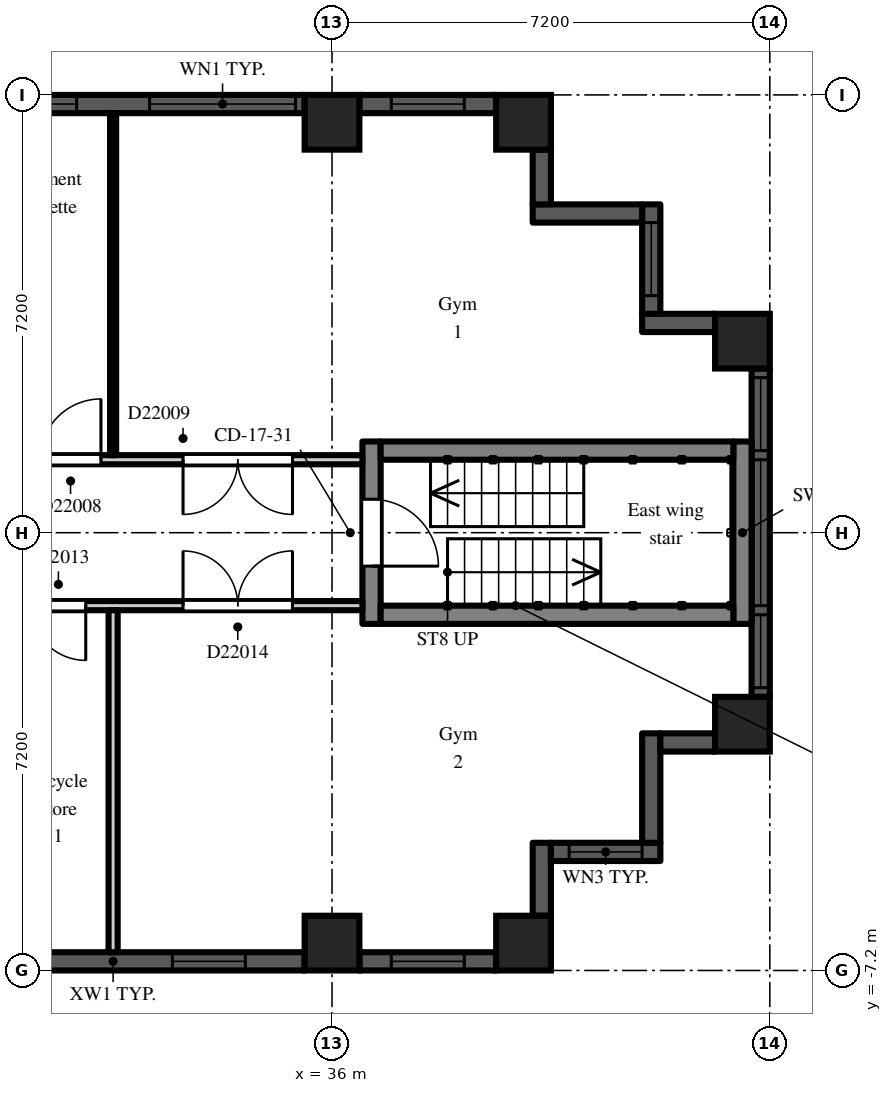
"""IFC4 building model, lengths in metres.
Left out: names, types, materials, properties, quantities, classifications, styles, units other than length and angle.
Written with IfcOpenShell. Run it as: python <this file> out.ifc"""

import sys

from ifc_helpers import new_model, si_unit, direction, frame, frame_2d, origin, origin_2d, place, context, subcontext, project, spatial, rectangle, extrude, element, fill, save


model = new_model("IFC4")
c1 = context("Model", 3, precision=1e-05, world=origin(), true_north=direction((0.0, 1.0)))
c2 = subcontext(c1, "Body", "Model", "MODEL_VIEW")
j1 = project(units=[si_unit("LENGTHUNIT", "METRE"), si_unit("PLANEANGLEUNIT", "RADIAN")], contexts=[c1])
p1 = place(None, origin())
s1 = spatial("IfcSite", under=j1, at=p1, CompositionType="ELEMENT")
p2 = place(p1, origin())
s2 = spatial("IfcBuilding", under=s1, at=p2, CompositionType="ELEMENT")
p3 = place(p2, frame((0.0, 0.0, 156.3)))
s3 = spatial("IfcBuildingStorey", under=s2, at=p3, CompositionType="ELEMENT", Elevation=156.3)
for number, where, z_axis, x_axis in (
    (1, (36.0, -6.75, 0.0), (0.0, 0.0, 1.0), (1.0, 0.0, 0.0)),
    (2, (36.0, 6.75, 0.0), (0.0, 0.0, 1.0), (1.0, 0.0, 0.0)),
    (3, (39.15, -6.75, 0.0), (0.0, 0.0, 1.0), (1.0, 0.0, 0.0)),
    (4, (39.15, 6.75, 0.0), (0.0, 0.0, 1.0), (1.0, 0.0, 0.0)),
    (5, (42.75, -3.15, 0.0), (0.0, 0.0, 1.0), (1.0, 0.0, 0.0)),
    (6, (42.75, 3.15, 0.0), (0.0, 0.0, 1.0), (1.0, 0.0, 0.0)),
):
    element("IfcColumn", number, at=place(p3, frame(where, z_axis=z_axis, x_axis=x_axis)), inside=s3, PredefinedType="COLUMN", context=c2, shape_type="SweptSolid", body=[
        extrude(rectangle(XDim=0.9, YDim=0.9, at=origin_2d()), origin(), (0.0, 0.0, 1.0), 3.0),
    ])
p4 = place(p3, frame((29.25, -7.05, 0.0), z_axis=(0.0, 0.0, 1.0), x_axis=(1.0, 0.0, 0.0)))
e7 = element("IfcWall", 7, at=p4, inside=s3, PredefinedType="SOLIDWALL", context=c2, shape_type="SweptSolid", body=[
    extrude(rectangle(XDim=6.3, YDim=0.3, at=frame_2d((3.15, 0.0))), origin(), (0.0, 0.0, 1.0), 2.2),
])
p5 = place(p4, frame((4.125, 0.0, 0.2)))
e8 = element("IfcOpeningElement", 8, at=p5, cuts=e7, PredefinedType="OPENING", context=c2, shape_type="SweptSolid", body=[
    extrude(rectangle(XDim=1.2, YDim=1.85, at=frame_2d((0.6, 0.925))), frame((0.0, 0.16, 0.0), z_axis=(0.0, -1.0, 0.0), x_axis=(1.0, 0.0, 0.0)), (0.0, 0.0, 1.0), 0.32),
])
p6 = place(p3, frame((36.45, -7.05, 0.0), z_axis=(0.0, 0.0, 1.0), x_axis=(1.0, 0.0, 0.0)))
e9 = element("IfcWall", 9, at=p6, inside=s3, PredefinedType="SOLIDWALL", context=c2, shape_type="SweptSolid", body=[
    extrude(rectangle(XDim=2.25, YDim=0.3, at=frame_2d((1.125, 0.0))), origin(), (0.0, 0.0, 1.0), 2.2),
])
p7 = place(p6, frame((0.525, 0.0, 0.2)))
e10 = element("IfcOpeningElement", 10, at=p7, cuts=e9, PredefinedType="OPENING", context=c2, shape_type="SweptSolid", body=[
    extrude(rectangle(XDim=1.2, YDim=1.85, at=frame_2d((0.6, 0.925))), frame((0.0, 0.16, 0.0), z_axis=(0.0, -1.0, 0.0), x_axis=(1.0, 0.0, 0.0)), (0.0, 0.0, 1.0), 0.32),
])
p8 = place(p3, frame((39.45, -6.3, 0.0), z_axis=(0.0, 0.0, 1.0), x_axis=(0.0, 1.0, 0.0)))
e11 = element("IfcWall", 11, at=p8, inside=s3, PredefinedType="SOLIDWALL", context=c2, shape_type="SweptSolid", body=[
    extrude(rectangle(XDim=1.2, YDim=0.3, at=frame_2d((0.6, 0.0))), origin(), (0.0, 0.0, 1.0), 2.6),
])
p9 = place(p3, frame((39.6, -5.25, 0.0), z_axis=(0.0, 0.0, 1.0), x_axis=(1.0, 0.0, 0.0)))
e12 = element("IfcWall", 12, at=p9, inside=s3, PredefinedType="SOLIDWALL", context=c2, shape_type="SweptSolid", body=[
    extrude(rectangle(XDim=1.8, YDim=0.3, at=frame_2d((0.9, 0.0))), origin(), (0.0, 0.0, 1.0), 2.6),
])
p10 = place(p9, frame((0.3, 0.0, 0.2)))
e13 = element("IfcOpeningElement", 13, at=p10, cuts=e12, PredefinedType="OPENING", context=c2, shape_type="SweptSolid", body=[
    extrude(rectangle(XDim=1.2, YDim=1.85, at=frame_2d((0.6, 0.925))), frame((0.0, 0.16, 0.0), z_axis=(0.0, -1.0, 0.0), x_axis=(1.0, 0.0, 0.0)), (0.0, 0.0, 1.0), 0.32),
])
p11 = place(p3, frame((41.25, -5.1, 0.0), z_axis=(0.0, 0.0, 1.0), x_axis=(0.0, 1.0, 0.0)))
e14 = element("IfcWall", 14, at=p11, inside=s3, PredefinedType="SOLIDWALL", context=c2, shape_type="SweptSolid", body=[
    extrude(rectangle(XDim=1.8, YDim=0.3, at=frame_2d((0.9, 0.0))), origin(), (0.0, 0.0, 1.0), 2.6),
])
p12 = place(p3, frame((41.4, -3.45, 0.0), z_axis=(0.0, 0.0, 1.0), x_axis=(1.0, 0.0, 0.0)))
e15 = element("IfcWall", 15, at=p12, inside=s3, PredefinedType="SOLIDWALL", context=c2, shape_type="SweptSolid", body=[
    extrude(rectangle(XDim=0.9, YDim=0.3, at=frame_2d((0.45, 0.0))), origin(), (0.0, 0.0, 1.0), 2.6),
])
p13 = place(p3, frame((43.05, -2.7, 0.0), z_axis=(0.0, 0.0, 1.0), x_axis=(0.0, 1.0, 0.0)))
e16 = element("IfcWall", 16, at=p13, inside=s3, PredefinedType="SOLIDWALL", context=c2, shape_type="SweptSolid", body=[
    extrude(rectangle(XDim=5.4, YDim=0.3, at=frame_2d((2.7, 0.0))), origin(), (0.0, 0.0, 1.0), 2.2),
])
p14 = place(p13, frame((1.5, 0.0, 0.2)))
e17 = element("IfcOpeningElement", 17, at=p14, cuts=e16, PredefinedType="OPENING", context=c2, shape_type="SweptSolid", body=[
    extrude(rectangle(XDim=2.4, YDim=1.85, at=frame_2d((1.2, 0.925))), frame((0.0, 0.16, 0.0), z_axis=(0.0, -1.0, 0.0), x_axis=(1.0, 0.0, 0.0)), (0.0, 0.0, 1.0), 0.32),
])
p15 = place(p13, frame((0.15, 0.0, 0.2)))
e18 = element("IfcOpeningElement", 18, at=p15, cuts=e16, PredefinedType="OPENING", context=c2, shape_type="SweptSolid", body=[
    extrude(rectangle(XDim=1.2, YDim=1.85, at=frame_2d((0.6, 0.925))), frame((0.0, 0.16, 0.0), z_axis=(0.0, -1.0, 0.0), x_axis=(1.0, 0.0, 0.0)), (0.0, 0.0, 1.0), 0.32),
])
p16 = place(p13, frame((4.05, 0.0, 0.2)))
e19 = element("IfcOpeningElement", 19, at=p16, cuts=e16, PredefinedType="OPENING", context=c2, shape_type="SweptSolid", body=[
    extrude(rectangle(XDim=1.2, YDim=1.85, at=frame_2d((0.6, 0.925))), frame((0.0, 0.16, 0.0), z_axis=(0.0, -1.0, 0.0), x_axis=(1.0, 0.0, 0.0)), (0.0, 0.0, 1.0), 0.32),
])
p17 = place(p3, frame((42.3, 3.45, 0.0), z_axis=(0.0, 0.0, 1.0), x_axis=(-1.0, 0.0, 0.0)))
e20 = element("IfcWall", 20, at=p17, inside=s3, PredefinedType="SOLIDWALL", context=c2, shape_type="SweptSolid", body=[
    extrude(rectangle(XDim=1.2, YDim=0.3, at=frame_2d((0.6, 0.0))), origin(), (0.0, 0.0, 1.0), 2.6),
])
p18 = place(p3, frame((41.25, 3.6, 0.0), z_axis=(0.0, 0.0, 1.0), x_axis=(0.0, 1.0, 0.0)))
e21 = element("IfcWall", 21, at=p18, inside=s3, PredefinedType="SOLIDWALL", context=c2, shape_type="SweptSolid", body=[
    extrude(rectangle(XDim=1.8, YDim=0.3, at=frame_2d((0.9, 0.0))), origin(), (0.0, 0.0, 1.0), 2.6),
])
p19 = place(p18, frame((0.3, 0.0, 0.2)))
e22 = element("IfcOpeningElement", 22, at=p19, cuts=e21, PredefinedType="OPENING", context=c2, shape_type="SweptSolid", body=[
    extrude(rectangle(XDim=1.2, YDim=1.85, at=frame_2d((0.6, 0.925))), frame((0.0, 0.16, 0.0), z_axis=(0.0, -1.0, 0.0), x_axis=(1.0, 0.0, 0.0)), (0.0, 0.0, 1.0), 0.32),
])
p20 = place(p3, frame((41.1, 5.25, 0.0), z_axis=(0.0, 0.0, 1.0), x_axis=(-1.0, 0.0, 0.0)))
e23 = element("IfcWall", 23, at=p20, inside=s3, PredefinedType="SOLIDWALL", context=c2, shape_type="SweptSolid", body=[
    extrude(rectangle(XDim=1.8, YDim=0.3, at=frame_2d((0.9, 0.0))), origin(), (0.0, 0.0, 1.0), 2.6),
])
p21 = place(p3, frame((39.45, 5.4, 0.0), z_axis=(0.0, 0.0, 1.0), x_axis=(0.0, 1.0, 0.0)))
e24 = element("IfcWall", 24, at=p21, inside=s3, PredefinedType="SOLIDWALL", context=c2, shape_type="SweptSolid", body=[
    extrude(rectangle(XDim=0.9, YDim=0.3, at=frame_2d((0.45, 0.0))), origin(), (0.0, 0.0, 1.0), 2.6),
])
p22 = place(p3, frame((38.7, 7.05, 0.0), z_axis=(0.0, 0.0, 1.0), x_axis=(-1.0, 0.0, 0.0)))
e25 = element("IfcWall", 25, at=p22, inside=s3, PredefinedType="SOLIDWALL", context=c2, shape_type="SweptSolid", body=[
    extrude(rectangle(XDim=2.25, YDim=0.3, at=frame_2d((1.125, 0.0))), origin(), (0.0, 0.0, 1.0), 2.2),
])
p23 = place(p22, frame((0.525, 0.0, 0.2)))
e26 = element("IfcOpeningElement", 26, at=p23, cuts=e25, PredefinedType="OPENING", context=c2, shape_type="SweptSolid", body=[
    extrude(rectangle(XDim=1.2, YDim=1.85, at=frame_2d((0.6, 0.925))), frame((0.0, 0.16, 0.0), z_axis=(0.0, -1.0, 0.0), x_axis=(1.0, 0.0, 0.0)), (0.0, 0.0, 1.0), 0.32),
])
p24 = place(p3, frame((35.55, 7.05, 0.0), z_axis=(0.0, 0.0, 1.0), x_axis=(-1.0, 0.0, 0.0)))
e27 = element("IfcWall", 27, at=p24, inside=s3, PredefinedType="SOLIDWALL", context=c2, shape_type="SweptSolid", body=[
    extrude(rectangle(XDim=6.3, YDim=0.3, at=frame_2d((3.15, 0.0))), origin(), (0.0, 0.0, 1.0), 2.2),
])
p25 = place(p24, frame((0.15, 0.0, 0.2)))
e28 = element("IfcOpeningElement", 28, at=p25, cuts=e27, PredefinedType="OPENING", context=c2, shape_type="SweptSolid", body=[
    extrude(rectangle(XDim=2.4, YDim=1.85, at=frame_2d((1.2, 0.925))), frame((0.0, 0.16, 0.0), z_axis=(0.0, -1.0, 0.0), x_axis=(1.0, 0.0, 0.0)), (0.0, 0.0, 1.0), 0.32),
])
p26 = place(p24, frame((3.75, 0.0, 0.2)))
e29 = element("IfcOpeningElement", 29, at=p26, cuts=e27, PredefinedType="OPENING", context=c2, shape_type="SweptSolid", body=[
    extrude(rectangle(XDim=2.4, YDim=1.85, at=frame_2d((1.2, 0.925))), frame((0.0, 0.16, 0.0), z_axis=(0.0, -1.0, 0.0), x_axis=(1.0, 0.0, 0.0)), (0.0, 0.0, 1.0), 0.32),
])
p27 = place(p3, frame((36.65, -1.5, 0.0), z_axis=(0.0, 0.0, 1.0), x_axis=(0.0, 1.0, 0.0)))
e30 = element("IfcWall", 30, at=p27, inside=s3, PredefinedType="SHEAR", context=c2, shape_type="SweptSolid", body=[
    extrude(rectangle(XDim=3.0, YDim=0.3, at=frame_2d((1.5, 0.0))), origin(), (0.0, 0.0, 1.0), 2.6),
])
p28 = place(p27, frame((0.95, 0.0, 0.0)))
e31 = element("IfcOpeningElement", 31, at=p28, cuts=e30, PredefinedType="OPENING", context=c2, shape_type="SweptSolid", body=[
    extrude(rectangle(XDim=1.1, YDim=2.1, at=frame_2d((0.55, 1.05))), frame((0.0, 0.16, 0.0), z_axis=(0.0, -1.0, 0.0), x_axis=(1.0, 0.0, 0.0)), (0.0, 0.0, 1.0), 0.32),
])
p29 = place(p3, frame((42.75, -1.5, 0.0), z_axis=(0.0, 0.0, 1.0), x_axis=(0.0, 1.0, 0.0)))
e32 = element("IfcWall", 32, at=p29, inside=s3, PredefinedType="SHEAR", context=c2, shape_type="SweptSolid", body=[
    extrude(rectangle(XDim=3.0, YDim=0.3, at=frame_2d((1.5, 0.0))), origin(), (0.0, 0.0, 1.0), 2.6),
])
for number, where, z_axis, x_axis in (
    (33, (36.8, -1.35, 0.0), (0.0, 0.0, 1.0), (1.0, 0.0, 0.0)),
    (34, (36.8, 1.35, 0.0), (0.0, 0.0, 1.0), (1.0, 0.0, 0.0)),
):
    element("IfcWall", number, at=place(p3, frame(where, z_axis=z_axis, x_axis=x_axis)), inside=s3, PredefinedType="SHEAR", context=c2, shape_type="SweptSolid", body=[
        extrude(rectangle(XDim=5.8, YDim=0.3, at=frame_2d((2.9, 0.0))), origin(), (0.0, 0.0, 1.0), 2.6),
    ])
p30 = place(p3, frame((21.6, -1.2, 0.0), z_axis=(0.0, 0.0, 1.0), x_axis=(1.0, 0.0, 0.0)))
e35 = element("IfcWall", 35, at=p30, inside=s3, PredefinedType="PARTITIONING", context=c2, shape_type="SweptSolid", body=[
    extrude(rectangle(XDim=14.9, YDim=0.15, at=frame_2d((7.45, 0.0))), origin(), (0.0, 0.0, 1.0), 2.6),
])
p31 = place(p30, frame((3.8, 0.0, 0.0)))
e36 = element("IfcOpeningElement", 36, at=p31, cuts=e35, PredefinedType="OPENING", context=c2, shape_type="SweptSolid", body=[
    extrude(rectangle(XDim=1.0, YDim=2.1, at=frame_2d((0.5, 1.05))), frame((0.0, 0.085, 0.0), z_axis=(0.0, -1.0, 0.0), x_axis=(1.0, 0.0, 0.0)), (0.0, 0.0, 1.0), 0.17),
])
p32 = place(p30, frame((7.65, 0.0, 0.0)))
e37 = element("IfcOpeningElement", 37, at=p32, cuts=e35, PredefinedType="OPENING", context=c2, shape_type="SweptSolid", body=[
    extrude(rectangle(XDim=0.9, YDim=2.1, at=frame_2d((0.45, 1.05))), frame((0.0, 0.085, 0.0), z_axis=(0.0, -1.0, 0.0), x_axis=(1.0, 0.0, 0.0)), (0.0, 0.0, 1.0), 0.17),
])
p33 = place(p30, frame((9.45, 0.0, 0.0)))
e38 = element("IfcOpeningElement", 38, at=p33, cuts=e35, PredefinedType="OPENING", context=c2, shape_type="SweptSolid", body=[
    extrude(rectangle(XDim=0.9, YDim=2.1, at=frame_2d((0.45, 1.05))), frame((0.0, 0.085, 0.0), z_axis=(0.0, -1.0, 0.0), x_axis=(1.0, 0.0, 0.0)), (0.0, 0.0, 1.0), 0.17),
])
p34 = place(p30, frame((11.95, 0.0, 0.0)))
e39 = element("IfcOpeningElement", 39, at=p34, cuts=e35, PredefinedType="OPENING", context=c2, shape_type="SweptSolid", body=[
    extrude(rectangle(XDim=1.8, YDim=2.1, at=frame_2d((0.9, 1.05))), frame((0.0, 0.085, 0.0), z_axis=(0.0, -1.0, 0.0), x_axis=(1.0, 0.0, 0.0)), (0.0, 0.0, 1.0), 0.17),
])
p35 = place(p3, frame((21.6, 1.2, 0.0), z_axis=(0.0, 0.0, 1.0), x_axis=(1.0, 0.0, 0.0)))
e40 = element("IfcWall", 40, at=p35, inside=s3, PredefinedType="PARTITIONING", context=c2, shape_type="SweptSolid", body=[
    extrude(rectangle(XDim=14.9, YDim=0.15, at=frame_2d((7.45, 0.0))), origin(), (0.0, 0.0, 1.0), 2.6),
])
p36 = place(p35, frame((2.7, 0.0, 0.0)))
e41 = element("IfcOpeningElement", 41, at=p36, cuts=e40, PredefinedType="OPENING", context=c2, shape_type="SweptSolid", body=[
    extrude(rectangle(XDim=1.8, YDim=2.1, at=frame_2d((0.9, 1.05))), frame((0.0, 0.085, 0.0), z_axis=(0.0, -1.0, 0.0), x_axis=(1.0, 0.0, 0.0)), (0.0, 0.0, 1.0), 0.17),
])
p37 = place(p35, frame((9.6, 0.0, 0.0)))
e42 = element("IfcOpeningElement", 42, at=p37, cuts=e40, PredefinedType="OPENING", context=c2, shape_type="SweptSolid", body=[
    extrude(rectangle(XDim=1.0, YDim=2.1, at=frame_2d((0.5, 1.05))), frame((0.0, 0.085, 0.0), z_axis=(0.0, -1.0, 0.0), x_axis=(1.0, 0.0, 0.0)), (0.0, 0.0, 1.0), 0.17),
])
p38 = place(p35, frame((11.95, 0.0, 0.0)))
e43 = element("IfcOpeningElement", 43, at=p38, cuts=e40, PredefinedType="OPENING", context=c2, shape_type="SweptSolid", body=[
    extrude(rectangle(XDim=1.8, YDim=2.1, at=frame_2d((0.9, 1.05))), frame((0.0, 0.085, 0.0), z_axis=(0.0, -1.0, 0.0), x_axis=(1.0, 0.0, 0.0)), (0.0, 0.0, 1.0), 0.17),
])
p39 = place(p3, frame((32.4, -6.9, 0.0), z_axis=(0.0, 0.0, 1.0), x_axis=(0.0, 1.0, 0.0)))
e44 = element("IfcWall", 44, at=p39, inside=s3, PredefinedType="PARTITIONING", context=c2, shape_type="SweptSolid", body=[
    extrude(rectangle(XDim=5.625, YDim=0.15, at=frame_2d((2.812, 0.0))), origin(), (0.0, 0.0, 1.0), 2.6),
])
p40 = place(p3, frame((32.4, 1.275, 0.0), z_axis=(0.0, 0.0, 1.0), x_axis=(0.0, 1.0, 0.0)))
e45 = element("IfcWall", 45, at=p40, inside=s3, PredefinedType="PARTITIONING", context=c2, shape_type="SweptSolid", body=[
    extrude(rectangle(XDim=5.625, YDim=0.1, at=frame_2d((2.812, 0.0))), origin(), (0.0, 0.0, 1.0), 2.6),
])
p41 = place(p5, origin())
e46 = element("IfcWindow", 46, at=p41, inside=s3, PartitioningType="SINGLE_PANEL", PredefinedType="WINDOW", context=c2, shape_type="SweptSolid", body=[
    extrude(rectangle(XDim=1.2, YDim=1.85, at=frame_2d((0.6, 0.925))), frame((0.0, 0.03, 0.0), z_axis=(0.0, -1.0, 0.0), x_axis=(1.0, 0.0, 0.0)), (0.0, 0.0, 1.0), 0.06),
])
fill(e8, e46)
p42 = place(p7, origin())
e47 = element("IfcWindow", 47, at=p42, inside=s3, PartitioningType="SINGLE_PANEL", PredefinedType="WINDOW", context=c2, shape_type="SweptSolid", body=[
    extrude(rectangle(XDim=1.2, YDim=1.85, at=frame_2d((0.6, 0.925))), frame((0.0, 0.03, 0.0), z_axis=(0.0, -1.0, 0.0), x_axis=(1.0, 0.0, 0.0)), (0.0, 0.0, 1.0), 0.06),
])
fill(e10, e47)
p43 = place(p10, origin())
e48 = element("IfcWindow", 48, at=p43, inside=s3, PartitioningType="SINGLE_PANEL", PredefinedType="WINDOW", context=c2, shape_type="SweptSolid", body=[
    extrude(rectangle(XDim=1.2, YDim=1.85, at=frame_2d((0.6, 0.925))), frame((0.0, 0.03, 0.0), z_axis=(0.0, -1.0, 0.0), x_axis=(1.0, 0.0, 0.0)), (0.0, 0.0, 1.0), 0.06),
])
fill(e13, e48)
p44 = place(p14, origin())
e49 = element("IfcWindow", 49, at=p44, inside=s3, PartitioningType="SINGLE_PANEL", PredefinedType="WINDOW", context=c2, shape_type="SweptSolid", body=[
    extrude(rectangle(XDim=2.4, YDim=1.85, at=frame_2d((1.2, 0.925))), frame((0.0, 0.03, 0.0), z_axis=(0.0, -1.0, 0.0), x_axis=(1.0, 0.0, 0.0)), (0.0, 0.0, 1.0), 0.06),
])
fill(e17, e49)
p45 = place(p15, origin())
e50 = element("IfcWindow", 50, at=p45, inside=s3, PartitioningType="SINGLE_PANEL", PredefinedType="WINDOW", context=c2, shape_type="SweptSolid", body=[
    extrude(rectangle(XDim=1.2, YDim=1.85, at=frame_2d((0.6, 0.925))), frame((0.0, 0.03, 0.0), z_axis=(0.0, -1.0, 0.0), x_axis=(1.0, 0.0, 0.0)), (0.0, 0.0, 1.0), 0.06),
])
fill(e18, e50)
p46 = place(p16, origin())
e51 = element("IfcWindow", 51, at=p46, inside=s3, PartitioningType="SINGLE_PANEL", PredefinedType="WINDOW", context=c2, shape_type="SweptSolid", body=[
    extrude(rectangle(XDim=1.2, YDim=1.85, at=frame_2d((0.6, 0.925))), frame((0.0, 0.03, 0.0), z_axis=(0.0, -1.0, 0.0), x_axis=(1.0, 0.0, 0.0)), (0.0, 0.0, 1.0), 0.06),
])
fill(e19, e51)
p47 = place(p19, origin())
e52 = element("IfcWindow", 52, at=p47, inside=s3, PartitioningType="SINGLE_PANEL", PredefinedType="WINDOW", context=c2, shape_type="SweptSolid", body=[
    extrude(rectangle(XDim=1.2, YDim=1.85, at=frame_2d((0.6, 0.925))), frame((0.0, 0.03, 0.0), z_axis=(0.0, -1.0, 0.0), x_axis=(1.0, 0.0, 0.0)), (0.0, 0.0, 1.0), 0.06),
])
fill(e22, e52)
p48 = place(p23, origin())
e53 = element("IfcWindow", 53, at=p48, inside=s3, PartitioningType="SINGLE_PANEL", PredefinedType="WINDOW", context=c2, shape_type="SweptSolid", body=[
    extrude(rectangle(XDim=1.2, YDim=1.85, at=frame_2d((0.6, 0.925))), frame((0.0, 0.03, 0.0), z_axis=(0.0, -1.0, 0.0), x_axis=(1.0, 0.0, 0.0)), (0.0, 0.0, 1.0), 0.06),
])
fill(e26, e53)
p49 = place(p25, origin())
e54 = element("IfcWindow", 54, at=p49, inside=s3, PartitioningType="SINGLE_PANEL", PredefinedType="WINDOW", context=c2, shape_type="SweptSolid", body=[
    extrude(rectangle(XDim=2.4, YDim=1.85, at=frame_2d((1.2, 0.925))), frame((0.0, 0.03, 0.0), z_axis=(0.0, -1.0, 0.0), x_axis=(1.0, 0.0, 0.0)), (0.0, 0.0, 1.0), 0.06),
])
fill(e28, e54)
p50 = place(p26, origin())
e55 = element("IfcWindow", 55, at=p50, inside=s3, PartitioningType="SINGLE_PANEL", PredefinedType="WINDOW", context=c2, shape_type="SweptSolid", body=[
    extrude(rectangle(XDim=2.4, YDim=1.85, at=frame_2d((1.2, 0.925))), frame((0.0, 0.03, 0.0), z_axis=(0.0, -1.0, 0.0), x_axis=(1.0, 0.0, 0.0)), (0.0, 0.0, 1.0), 0.06),
])
fill(e29, e55)
p51 = place(p28, frame((1.1, 0.0, 0.0), z_axis=(0.0, 0.0, 1.0), x_axis=(-1.0, 0.0, 0.0)))
e56 = element("IfcDoor", 56, at=p51, inside=s3, OperationType="SINGLE_SWING_RIGHT", PredefinedType="DOOR", context=c2, shape_type="SweptSolid", body=[
    extrude(rectangle(XDim=1.1, YDim=2.1, at=frame_2d((0.55, 1.05))), frame((0.0, 0.025, 0.0), z_axis=(0.0, -1.0, 0.0), x_axis=(1.0, 0.0, 0.0)), (0.0, 0.0, 1.0), 0.05),
])
fill(e31, e56)
p52 = place(p37, origin())
e57 = element("IfcDoor", 57, at=p52, inside=s3, OperationType="SINGLE_SWING_RIGHT", PredefinedType="DOOR", context=c2, shape_type="SweptSolid", body=[
    extrude(rectangle(XDim=1.0, YDim=2.1, at=frame_2d((0.5, 1.05))), frame((0.0, 0.025, 0.0), z_axis=(0.0, -1.0, 0.0), x_axis=(1.0, 0.0, 0.0)), (0.0, 0.0, 1.0), 0.05),
])
fill(e42, e57)
p53 = place(p38, frame((1.8, 0.0, 0.0), z_axis=(0.0, 0.0, 1.0), x_axis=(-1.0, 0.0, 0.0)))
e58 = element("IfcDoor", 58, at=p53, inside=s3, OperationType="DOUBLE_DOOR_DOUBLE_SWING", PredefinedType="DOOR", context=c2, shape_type="SweptSolid", body=[
    extrude(rectangle(XDim=1.8, YDim=2.1, at=frame_2d((0.9, 1.05))), frame((0.0, 0.025, 0.0), z_axis=(0.0, -1.0, 0.0), x_axis=(1.0, 0.0, 0.0)), (0.0, 0.0, 1.0), 0.05),
])
fill(e43, e58)
p54 = place(p33, frame((0.9, 0.0, 0.0), z_axis=(0.0, 0.0, 1.0), x_axis=(-1.0, 0.0, 0.0)))
e59 = element("IfcDoor", 59, at=p54, inside=s3, OperationType="SINGLE_SWING_LEFT", PredefinedType="DOOR", context=c2, shape_type="SweptSolid", body=[
    extrude(rectangle(XDim=0.9, YDim=2.1, at=frame_2d((0.45, 1.05))), frame((0.0, 0.025, 0.0), z_axis=(0.0, -1.0, 0.0), x_axis=(1.0, 0.0, 0.0)), (0.0, 0.0, 1.0), 0.05),
])
fill(e38, e59)
p55 = place(p34, origin())
e60 = element("IfcDoor", 60, at=p55, inside=s3, OperationType="DOUBLE_DOOR_DOUBLE_SWING", PredefinedType="DOOR", context=c2, shape_type="SweptSolid", body=[
    extrude(rectangle(XDim=1.8, YDim=2.1, at=frame_2d((0.9, 1.05))), frame((0.0, 0.025, 0.0), z_axis=(0.0, -1.0, 0.0), x_axis=(1.0, 0.0, 0.0)), (0.0, 0.0, 1.0), 0.05),
])
fill(e39, e60)
save(model, sys.argv[1])
